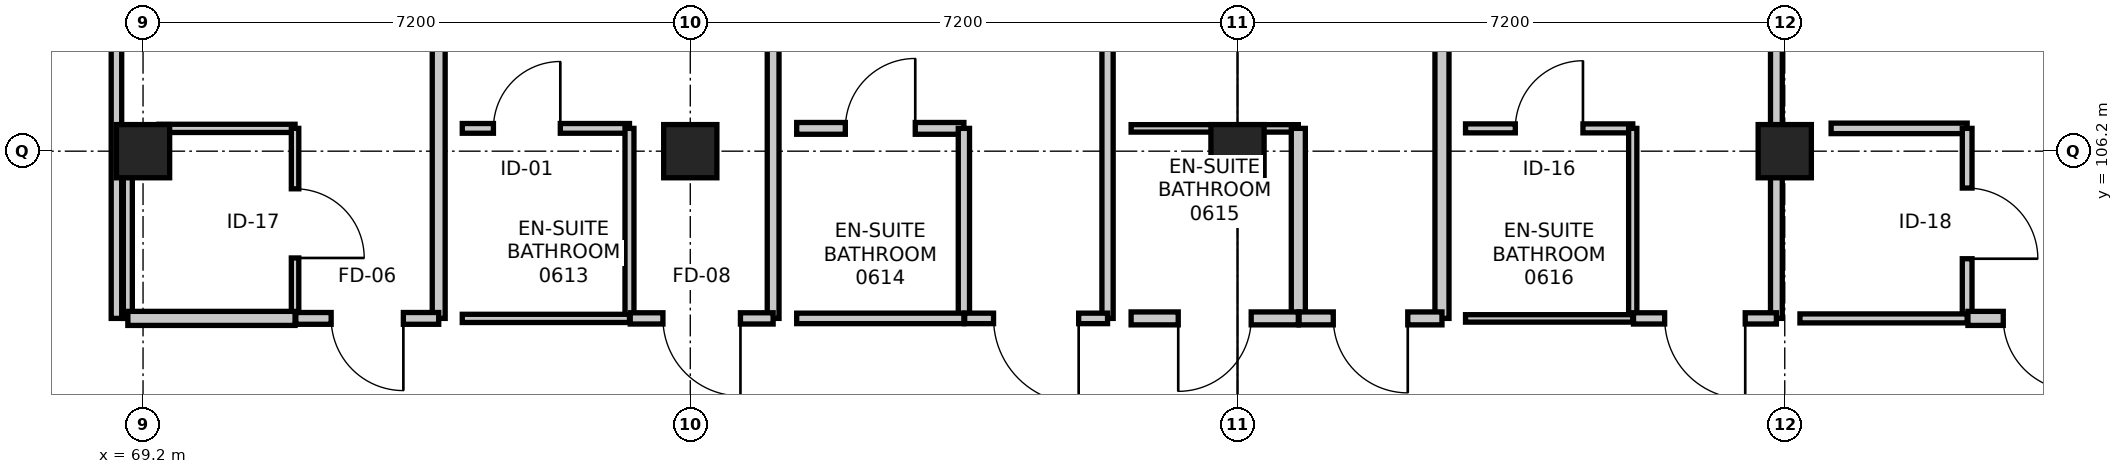
"""IFC4 building model, lengths in metres.
Left out: names, types, materials, properties, quantities, classifications, styles, units other than length and angle.
Written with IfcOpenShell. Run it as: python <this file> out.ifc"""

import sys

from ifc_helpers import new_model, si_unit, direction, frame, frame_2d, origin, origin_2d, place, context, subcontext, project, spatial, rectangle, extrude, element, fill, save


model = new_model("IFC4")
c1 = context("Model", 3, precision=1e-05, world=origin(), true_north=direction((0.0, 1.0)))
c2 = subcontext(c1, "Body", "Model", "MODEL_VIEW")
j1 = project(units=[si_unit("LENGTHUNIT", "METRE"), si_unit("PLANEANGLEUNIT", "RADIAN")], contexts=[c1])
p1 = place(None, origin())
s1 = spatial("IfcSite", under=j1, at=p1, CompositionType="ELEMENT")
p2 = place(p1, origin())
s2 = spatial("IfcBuilding", under=s1, at=p2, CompositionType="ELEMENT")
p3 = place(p2, frame((0.0, 0.0, 26.4)))
s3 = spatial("IfcBuildingStorey", under=s2, at=p3, CompositionType="ELEMENT", Elevation=26.4)
for number, where, z_axis, x_axis in (
    (1, (69.2, 106.2, 0.0), (0.0, 0.0, 1.0), (1.0, 0.0, 0.0)),
    (2, (76.4, 106.2, 0.0), (0.0, 0.0, 1.0), (1.0, 0.0, 0.0)),
    (3, (83.6, 106.2, 0.0), (0.0, 0.0, 1.0), (1.0, 0.0, 0.0)),
    (4, (90.8, 106.2, 0.0), (0.0, 0.0, 1.0), (1.0, 0.0, 0.0)),
):
    element("IfcColumn", number, at=place(p3, frame(where, z_axis=z_axis, x_axis=x_axis)), inside=s3, PredefinedType="COLUMN", context=c2, shape_type="SweptSolid", body=[
        extrude(rectangle(XDim=0.7, YDim=0.7, at=origin_2d()), origin(), (0.0, 0.0, 1.0), 3.6),
    ])
p4 = place(p3, frame((69.0, 104.0, 0.0), z_axis=(0.0, 0.0, 1.0), x_axis=(0.0, 1.0, 0.0)))
e5 = element("IfcWall", 5, at=p4, inside=s3, PredefinedType="PARTITIONING", context=c2, shape_type="SweptSolid", body=[
    extrude(rectangle(XDim=2.09, YDim=0.118, at=frame_2d((1.045, 0.0))), origin(), (0.0, 0.0, 1.0), 2.685),
])
p5 = place(p3, frame((69.41, 106.5, 0.0), z_axis=(0.0, 0.0, 1.0), x_axis=(1.0, 0.0, 0.0)))
e6 = element("IfcWall", 6, at=p5, inside=s3, PredefinedType="PARTITIONING", context=c2, shape_type="SweptSolid", body=[
    extrude(rectangle(XDim=1.79, YDim=0.108, at=frame_2d((0.895, 0.0))), origin(), (0.0, 0.0, 1.0), 3.35),
])
p6 = place(p3, frame((71.2, 106.5, 0.0), z_axis=(0.0, 0.0, 1.0), x_axis=(0.0, -1.0, 0.0)))
e7 = element("IfcWall", 7, at=p6, inside=s3, PredefinedType="PARTITIONING", context=c2, shape_type="SweptSolid", body=[
    extrude(rectangle(XDim=2.5, YDim=0.098, at=frame_2d((1.25, 0.0))), origin(), (0.0, 0.0, 1.0), 2.735),
])
p7 = place(p6, frame((0.795, 0.0, 0.0)))
e8 = element("IfcOpeningElement", 8, at=p7, cuts=e7, PredefinedType="OPENING", context=c2, shape_type="SweptSolid", body=[
    extrude(rectangle(XDim=0.91, YDim=2.11, at=frame_2d((0.455, 1.055))), frame((0.0, 0.059, 0.0), z_axis=(0.0, -1.0, 0.0), x_axis=(1.0, 0.0, 0.0)), (0.0, 0.0, 1.0), 0.118),
])
p8 = place(p3, frame((71.2, 104.0, 0.0), z_axis=(0.0, 0.0, 1.0), x_axis=(-1.0, 0.0, 0.0)))
e9 = element("IfcWall", 9, at=p8, inside=s3, PredefinedType="PARTITIONING", context=c2, shape_type="SweptSolid", body=[
    extrude(rectangle(XDim=2.2, YDim=0.185, at=frame_2d((1.1, 0.0))), origin(), (0.0, 0.0, 1.0), 2.685),
])
p9 = place(p3, frame((68.85, 104.0, 0.0), z_axis=(0.0, 0.0, 1.0), x_axis=(0.0, 1.0, 0.0)))
e10 = element("IfcWall", 10, at=p9, inside=s3, PredefinedType="PARTITIONING", context=c2, shape_type="SweptSolid", body=[
    extrude(rectangle(XDim=10.741, YDim=0.138, at=frame_2d((5.371, 0.0))), origin(), (0.0, 0.0, 1.0), 2.735),
])
p10 = place(p3, frame((73.09, 115.362, 0.0), z_axis=(0.0, 0.0, 1.0), x_axis=(0.0, -1.0, 0.0)))
e11 = element("IfcWall", 11, at=p10, inside=s3, PredefinedType="PARTITIONING", context=c2, shape_type="SweptSolid", body=[
    extrude(rectangle(XDim=11.362, YDim=0.17, at=frame_2d((5.681, 0.0))), origin(), (0.0, 0.0, 1.0), 2.735),
])
p11 = place(p3, frame((73.09, 104.0, 0.0), z_axis=(0.0, 0.0, 1.0), x_axis=(-1.0, 0.0, 0.0)))
e12 = element("IfcWall", 12, at=p11, inside=s3, PredefinedType="PARTITIONING", context=c2, shape_type="SweptSolid", body=[
    extrude(rectangle(XDim=1.88, YDim=0.155, at=frame_2d((0.94, 0.0))), origin(), (0.0, 0.0, 1.0), 3.35),
])
p12 = place(p11, frame((0.465, 0.0, 0.0)))
e13 = element("IfcOpeningElement", 13, at=p12, cuts=e12, PredefinedType="OPENING", context=c2, shape_type="SweptSolid", body=[
    extrude(rectangle(XDim=0.95, YDim=2.1, at=frame_2d((0.475, 1.05))), frame((0.0, 0.087, 0.0), z_axis=(0.0, -1.0, 0.0), x_axis=(1.0, 0.0, 0.0)), (0.0, 0.0, 1.0), 0.175),
])
p13 = place(p3, frame((73.4, 106.5, 0.0), z_axis=(0.0, 0.0, 1.0), x_axis=(1.0, 0.0, 0.0)))
e14 = element("IfcWall", 14, at=p13, inside=s3, PredefinedType="PARTITIONING", context=c2, shape_type="SweptSolid", body=[
    extrude(rectangle(XDim=2.2, YDim=0.128, at=frame_2d((1.1, 0.0))), origin(), (0.0, 0.0, 1.0), 3.35),
])
p14 = place(p13, frame((0.41, 0.0, 0.0)))
e15 = element("IfcOpeningElement", 15, at=p14, cuts=e14, PredefinedType="OPENING", context=c2, shape_type="SweptSolid", body=[
    extrude(rectangle(XDim=0.88, YDim=2.06, at=frame_2d((0.44, 1.03))), frame((0.0, 0.074, 0.0), z_axis=(0.0, -1.0, 0.0), x_axis=(1.0, 0.0, 0.0)), (0.0, 0.0, 1.0), 0.148),
])
p15 = place(p3, frame((75.6, 106.5, 0.0), z_axis=(0.0, 0.0, 1.0), x_axis=(0.0, -1.0, 0.0)))
e16 = element("IfcWall", 16, at=p15, inside=s3, PredefinedType="PARTITIONING", context=c2, shape_type="SweptSolid", body=[
    extrude(rectangle(XDim=2.5, YDim=0.118, at=frame_2d((1.25, 0.0))), origin(), (0.0, 0.0, 1.0), 2.735),
])
p16 = place(p3, frame((75.6, 104.0, 0.0), z_axis=(0.0, 0.0, 1.0), x_axis=(-1.0, 0.0, 0.0)))
e17 = element("IfcWall", 17, at=p16, inside=s3, PredefinedType="PARTITIONING", context=c2, shape_type="SweptSolid", body=[
    extrude(rectangle(XDim=2.2, YDim=0.108, at=frame_2d((1.1, 0.0))), origin(), (0.0, 0.0, 1.0), 3.35),
])
p17 = place(p3, frame((77.49, 115.603, 0.0), z_axis=(0.0, 0.0, 1.0), x_axis=(0.0, -1.0, 0.0)))
e18 = element("IfcWall", 18, at=p17, inside=s3, PredefinedType="PARTITIONING", context=c2, shape_type="SweptSolid", body=[
    extrude(rectangle(XDim=11.603, YDim=0.155, at=frame_2d((5.801, 0.0))), origin(), (0.0, 0.0, 1.0), 2.735),
])
p18 = place(p3, frame((77.49, 104.0, 0.0), z_axis=(0.0, 0.0, 1.0), x_axis=(-1.0, 0.0, 0.0)))
e19 = element("IfcWall", 19, at=p18, inside=s3, PredefinedType="PARTITIONING", context=c2, shape_type="SweptSolid", body=[
    extrude(rectangle(XDim=1.88, YDim=0.148, at=frame_2d((0.94, 0.0))), origin(), (0.0, 0.0, 1.0), 2.685),
])
p19 = place(p18, frame((0.43, 0.0, 0.0)))
e20 = element("IfcOpeningElement", 20, at=p19, cuts=e19, PredefinedType="OPENING", context=c2, shape_type="SweptSolid", body=[
    extrude(rectangle(XDim=1.02, YDim=2.15, at=frame_2d((0.51, 1.075))), frame((0.0, 0.084, 0.0), z_axis=(0.0, -1.0, 0.0), x_axis=(1.0, 0.0, 0.0)), (0.0, 0.0, 1.0), 0.168),
])
p20 = place(p3, frame((77.8, 106.5, 0.0), z_axis=(0.0, 0.0, 1.0), x_axis=(1.0, 0.0, 0.0)))
e21 = element("IfcWall", 21, at=p20, inside=s3, PredefinedType="PARTITIONING", context=c2, shape_type="SweptSolid", body=[
    extrude(rectangle(XDim=2.2, YDim=0.155, at=frame_2d((1.1, 0.0))), origin(), (0.0, 0.0, 1.0), 3.35),
])
p21 = place(p20, frame((0.64, 0.0, 0.0)))
e22 = element("IfcOpeningElement", 22, at=p21, cuts=e21, PredefinedType="OPENING", context=c2, shape_type="SweptSolid", body=[
    extrude(rectangle(XDim=0.92, YDim=2.1, at=frame_2d((0.46, 1.05))), frame((0.0, 0.087, 0.0), z_axis=(0.0, -1.0, 0.0), x_axis=(1.0, 0.0, 0.0)), (0.0, 0.0, 1.0), 0.175),
])
p22 = place(p3, frame((80.0, 106.5, 0.0), z_axis=(0.0, 0.0, 1.0), x_axis=(0.0, -1.0, 0.0)))
e23 = element("IfcWall", 23, at=p22, inside=s3, PredefinedType="PARTITIONING", context=c2, shape_type="SweptSolid", body=[
    extrude(rectangle(XDim=2.5, YDim=0.148, at=frame_2d((1.25, 0.0))), origin(), (0.0, 0.0, 1.0), 2.735),
])
p23 = place(p3, frame((80.0, 104.0, 0.0), z_axis=(0.0, 0.0, 1.0), x_axis=(-1.0, 0.0, 0.0)))
e24 = element("IfcWall", 24, at=p23, inside=s3, PredefinedType="PARTITIONING", context=c2, shape_type="SweptSolid", body=[
    extrude(rectangle(XDim=2.2, YDim=0.138, at=frame_2d((1.1, 0.0))), origin(), (0.0, 0.0, 1.0), 3.35),
])
p24 = place(p3, frame((81.89, 115.805, 0.0), z_axis=(0.0, 0.0, 1.0), x_axis=(0.0, -1.0, 0.0)))
e25 = element("IfcWall", 25, at=p24, inside=s3, PredefinedType="PARTITIONING", context=c2, shape_type="SweptSolid", body=[
    extrude(rectangle(XDim=11.805, YDim=0.148, at=frame_2d((5.903, 0.0))), origin(), (0.0, 0.0, 1.0), 2.735),
])
p25 = place(p3, frame((81.89, 104.0, 0.0), z_axis=(0.0, 0.0, 1.0), x_axis=(-1.0, 0.0, 0.0)))
e26 = element("IfcWall", 26, at=p25, inside=s3, PredefinedType="PARTITIONING", context=c2, shape_type="SweptSolid", body=[
    extrude(rectangle(XDim=1.88, YDim=0.138, at=frame_2d((0.94, 0.0))), origin(), (0.0, 0.0, 1.0), 3.35),
])
p26 = place(p25, frame((0.38, 0.0, 0.0)))
e27 = element("IfcOpeningElement", 27, at=p26, cuts=e26, PredefinedType="OPENING", context=c2, shape_type="SweptSolid", body=[
    extrude(rectangle(XDim=1.12, YDim=2.2, at=frame_2d((0.56, 1.1))), frame((0.0, 0.079, 0.0), z_axis=(0.0, -1.0, 0.0), x_axis=(1.0, 0.0, 0.0)), (0.0, 0.0, 1.0), 0.158),
])
p27 = place(p3, frame((82.2, 106.5, 0.0), z_axis=(0.0, 0.0, 1.0), x_axis=(1.0, 0.0, 0.0)))
e28 = element("IfcWall", 28, at=p27, inside=s3, PredefinedType="PARTITIONING", context=c2, shape_type="SweptSolid", body=[
    extrude(rectangle(XDim=2.2, YDim=0.098, at=frame_2d((1.1, 0.0))), origin(), (0.0, 0.0, 1.0), 2.685),
])
p28 = place(p3, frame((84.4, 106.5, 0.0), z_axis=(0.0, 0.0, 1.0), x_axis=(0.0, -1.0, 0.0)))
e29 = element("IfcWall", 29, at=p28, inside=s3, PredefinedType="PARTITIONING", context=c2, shape_type="SweptSolid", body=[
    extrude(rectangle(XDim=2.5, YDim=0.185, at=frame_2d((1.25, 0.0))), origin(), (0.0, 0.0, 1.0), 2.735),
])
p29 = place(p3, frame((84.4, 104.0, 0.0), z_axis=(0.0, 0.0, 1.0), x_axis=(-1.0, 0.0, 0.0)))
e30 = element("IfcWall", 30, at=p29, inside=s3, PredefinedType="PARTITIONING", context=c2, shape_type="SweptSolid", body=[
    extrude(rectangle(XDim=2.2, YDim=0.17, at=frame_2d((1.1, 0.0))), origin(), (0.0, 0.0, 1.0), 2.685),
])
p30 = place(p29, frame((0.62, 0.0, 0.0)))
e31 = element("IfcOpeningElement", 31, at=p30, cuts=e30, PredefinedType="OPENING", context=c2, shape_type="SweptSolid", body=[
    extrude(rectangle(XDim=0.96, YDim=2.14, at=frame_2d((0.48, 1.07))), frame((0.0, 0.095, 0.0), z_axis=(0.0, -1.0, 0.0), x_axis=(1.0, 0.0, 0.0)), (0.0, 0.0, 1.0), 0.19),
])
p31 = place(p3, frame((86.29, 115.965, 0.0), z_axis=(0.0, 0.0, 1.0), x_axis=(0.0, -1.0, 0.0)))
e32 = element("IfcWall", 32, at=p31, inside=s3, PredefinedType="PARTITIONING", context=c2, shape_type="SweptSolid", body=[
    extrude(rectangle(XDim=11.965, YDim=0.185, at=frame_2d((5.983, 0.0))), origin(), (0.0, 0.0, 1.0), 2.735),
])
p32 = place(p3, frame((86.29, 104.0, 0.0), z_axis=(0.0, 0.0, 1.0), x_axis=(-1.0, 0.0, 0.0)))
e33 = element("IfcWall", 33, at=p32, inside=s3, PredefinedType="PARTITIONING", context=c2, shape_type="SweptSolid", body=[
    extrude(rectangle(XDim=1.88, YDim=0.17, at=frame_2d((0.94, 0.0))), origin(), (0.0, 0.0, 1.0), 3.35),
])
p33 = place(p32, frame((0.45, 0.0, 0.0)))
e34 = element("IfcOpeningElement", 34, at=p33, cuts=e33, PredefinedType="OPENING", context=c2, shape_type="SweptSolid", body=[
    extrude(rectangle(XDim=0.98, YDim=2.15, at=frame_2d((0.49, 1.075))), frame((0.0, 0.095, 0.0), z_axis=(0.0, -1.0, 0.0), x_axis=(1.0, 0.0, 0.0)), (0.0, 0.0, 1.0), 0.19),
])
p34 = place(p3, frame((86.6, 106.5, 0.0), z_axis=(0.0, 0.0, 1.0), x_axis=(1.0, 0.0, 0.0)))
e35 = element("IfcWall", 35, at=p34, inside=s3, PredefinedType="PARTITIONING", context=c2, shape_type="SweptSolid", body=[
    extrude(rectangle(XDim=2.2, YDim=0.118, at=frame_2d((1.1, 0.0))), origin(), (0.0, 0.0, 1.0), 3.35),
])
p35 = place(p34, frame((0.655, 0.0, 0.0)))
e36 = element("IfcOpeningElement", 36, at=p35, cuts=e35, PredefinedType="OPENING", context=c2, shape_type="SweptSolid", body=[
    extrude(rectangle(XDim=0.89, YDim=2.09, at=frame_2d((0.445, 1.045))), frame((0.0, 0.069, 0.0), z_axis=(0.0, -1.0, 0.0), x_axis=(1.0, 0.0, 0.0)), (0.0, 0.0, 1.0), 0.138),
])
p36 = place(p3, frame((88.8, 106.5, 0.0), z_axis=(0.0, 0.0, 1.0), x_axis=(0.0, -1.0, 0.0)))
e37 = element("IfcWall", 37, at=p36, inside=s3, PredefinedType="PARTITIONING", context=c2, shape_type="SweptSolid", body=[
    extrude(rectangle(XDim=2.5, YDim=0.108, at=frame_2d((1.25, 0.0))), origin(), (0.0, 0.0, 1.0), 2.735),
])
p37 = place(p3, frame((88.8, 104.0, 0.0), z_axis=(0.0, 0.0, 1.0), x_axis=(-1.0, 0.0, 0.0)))
e38 = element("IfcWall", 38, at=p37, inside=s3, PredefinedType="PARTITIONING", context=c2, shape_type="SweptSolid", body=[
    extrude(rectangle(XDim=2.2, YDim=0.098, at=frame_2d((1.1, 0.0))), origin(), (0.0, 0.0, 1.0), 3.35),
])
p38 = place(p3, frame((90.69, 115.717, 0.0), z_axis=(0.0, 0.0, 1.0), x_axis=(0.0, -1.0, 0.0)))
e39 = element("IfcWall", 39, at=p38, inside=s3, PredefinedType="PARTITIONING", context=c2, shape_type="SweptSolid", body=[
    extrude(rectangle(XDim=11.717, YDim=0.155, at=frame_2d((5.859, 0.0))), origin(), (0.0, 0.0, 1.0), 2.685),
])
p39 = place(p3, frame((90.69, 104.0, 0.0), z_axis=(0.0, 0.0, 1.0), x_axis=(-1.0, 0.0, 0.0)))
e40 = element("IfcWall", 40, at=p39, inside=s3, PredefinedType="PARTITIONING", context=c2, shape_type="SweptSolid", body=[
    extrude(rectangle(XDim=1.88, YDim=0.148, at=frame_2d((0.94, 0.0))), origin(), (0.0, 0.0, 1.0), 2.685),
])
p40 = place(p39, frame((0.41, 0.0, 0.0)))
e41 = element("IfcOpeningElement", 41, at=p40, cuts=e40, PredefinedType="OPENING", context=c2, shape_type="SweptSolid", body=[
    extrude(rectangle(XDim=1.06, YDim=2.2, at=frame_2d((0.53, 1.1))), frame((0.0, 0.084, 0.0), z_axis=(0.0, -1.0, 0.0), x_axis=(1.0, 0.0, 0.0)), (0.0, 0.0, 1.0), 0.168),
])
p41 = place(p3, frame((91.41, 106.5, 0.0), z_axis=(0.0, 0.0, 1.0), x_axis=(1.0, 0.0, 0.0)))
e42 = element("IfcWall", 42, at=p41, inside=s3, PredefinedType="PARTITIONING", context=c2, shape_type="SweptSolid", body=[
    extrude(rectangle(XDim=1.79, YDim=0.138, at=frame_2d((0.895, 0.0))), origin(), (0.0, 0.0, 1.0), 3.35),
])
p42 = place(p3, frame((93.2, 106.5, 0.0), z_axis=(0.0, 0.0, 1.0), x_axis=(0.0, -1.0, 0.0)))
e43 = element("IfcWall", 43, at=p42, inside=s3, PredefinedType="PARTITIONING", context=c2, shape_type="SweptSolid", body=[
    extrude(rectangle(XDim=2.5, YDim=0.128, at=frame_2d((1.25, 0.0))), origin(), (0.0, 0.0, 1.0), 2.735),
])
p43 = place(p42, frame((0.785, 0.0, 0.0)))
e44 = element("IfcOpeningElement", 44, at=p43, cuts=e43, PredefinedType="OPENING", context=c2, shape_type="SweptSolid", body=[
    extrude(rectangle(XDim=0.93, YDim=2.13, at=frame_2d((0.465, 1.065))), frame((0.0, 0.074, 0.0), z_axis=(0.0, -1.0, 0.0), x_axis=(1.0, 0.0, 0.0)), (0.0, 0.0, 1.0), 0.148),
])
p44 = place(p3, frame((93.2, 104.0, 0.0), z_axis=(0.0, 0.0, 1.0), x_axis=(-1.0, 0.0, 0.0)))
e45 = element("IfcWall", 45, at=p44, inside=s3, PredefinedType="PARTITIONING", context=c2, shape_type="SweptSolid", body=[
    extrude(rectangle(XDim=2.2, YDim=0.118, at=frame_2d((1.1, 0.0))), origin(), (0.0, 0.0, 1.0), 2.685),
])
p45 = place(p3, frame((95.09, 104.0, 0.0), z_axis=(0.0, 0.0, 1.0), x_axis=(-1.0, 0.0, 0.0)))
e46 = element("IfcWall", 46, at=p45, inside=s3, PredefinedType="PARTITIONING", context=c2, shape_type="SweptSolid", body=[
    extrude(rectangle(XDim=1.88, YDim=0.185, at=frame_2d((0.94, 0.0))), origin(), (0.0, 0.0, 1.0), 3.35),
])
p46 = place(p45, frame((0.465, 0.0, 0.0)))
e47 = element("IfcOpeningElement", 47, at=p46, cuts=e46, PredefinedType="OPENING", context=c2, shape_type="SweptSolid", body=[
    extrude(rectangle(XDim=0.95, YDim=2.1, at=frame_2d((0.475, 1.05))), frame((0.0, 0.103, 0.0), z_axis=(0.0, -1.0, 0.0), x_axis=(1.0, 0.0, 0.0)), (0.0, 0.0, 1.0), 0.205),
])
p47 = place(p7, origin())
e48 = element("IfcDoor", 48, at=p47, inside=s3, OperationType="SINGLE_SWING_RIGHT", PredefinedType="DOOR", context=c2, shape_type="SweptSolid", body=[
    extrude(rectangle(XDim=0.91, YDim=2.11, at=frame_2d((0.455, 1.055))), frame((0.0, 0.025, 0.0), z_axis=(0.0, -1.0, 0.0), x_axis=(1.0, 0.0, 0.0)), (0.0, 0.0, 1.0), 0.05),
])
fill(e8, e48)
p48 = place(p12, origin())
e49 = element("IfcDoor", 49, at=p48, inside=s3, OperationType="SINGLE_SWING_LEFT", PredefinedType="DOOR", context=c2, shape_type="SweptSolid", body=[
    extrude(rectangle(XDim=0.95, YDim=2.1, at=frame_2d((0.475, 1.05))), frame((0.0, 0.025, 0.0), z_axis=(0.0, -1.0, 0.0), x_axis=(1.0, 0.0, 0.0)), (0.0, 0.0, 1.0), 0.05),
])
fill(e13, e49)
p49 = place(p14, origin())
e50 = element("IfcDoor", 50, at=p49, inside=s3, OperationType="SINGLE_SWING_RIGHT", PredefinedType="DOOR", context=c2, shape_type="SweptSolid", body=[
    extrude(rectangle(XDim=0.88, YDim=2.06, at=frame_2d((0.44, 1.03))), frame((0.0, 0.025, 0.0), z_axis=(0.0, -1.0, 0.0), x_axis=(1.0, 0.0, 0.0)), (0.0, 0.0, 1.0), 0.05),
])
fill(e15, e50)
p50 = place(p19, origin())
e51 = element("IfcDoor", 51, at=p50, inside=s3, OperationType="SINGLE_SWING_LEFT", PredefinedType="DOOR", context=c2, shape_type="SweptSolid", body=[
    extrude(rectangle(XDim=1.02, YDim=2.15, at=frame_2d((0.51, 1.075))), frame((0.0, 0.025, 0.0), z_axis=(0.0, -1.0, 0.0), x_axis=(1.0, 0.0, 0.0)), (0.0, 0.0, 1.0), 0.05),
])
fill(e20, e51)
p51 = place(p21, origin())
e52 = element("IfcDoor", 52, at=p51, inside=s3, OperationType="SINGLE_SWING_RIGHT", PredefinedType="DOOR", context=c2, shape_type="SweptSolid", body=[
    extrude(rectangle(XDim=0.92, YDim=2.1, at=frame_2d((0.46, 1.05))), frame((0.0, 0.025, 0.0), z_axis=(0.0, -1.0, 0.0), x_axis=(1.0, 0.0, 0.0)), (0.0, 0.0, 1.0), 0.05),
])
fill(e22, e52)
p52 = place(p26, origin())
e53 = element("IfcDoor", 53, at=p52, inside=s3, OperationType="SINGLE_SWING_LEFT", PredefinedType="DOOR", context=c2, shape_type="SweptSolid", body=[
    extrude(rectangle(XDim=1.12, YDim=2.2, at=frame_2d((0.56, 1.1))), frame((0.0, 0.025, 0.0), z_axis=(0.0, -1.0, 0.0), x_axis=(1.0, 0.0, 0.0)), (0.0, 0.0, 1.0), 0.05),
])
fill(e27, e53)
p53 = place(p30, origin())
e54 = element("IfcDoor", 54, at=p53, inside=s3, OperationType="SINGLE_SWING_RIGHT", PredefinedType="DOOR", context=c2, shape_type="SweptSolid", body=[
    extrude(rectangle(XDim=0.96, YDim=2.14, at=frame_2d((0.48, 1.07))), frame((0.0, 0.025, 0.0), z_axis=(0.0, -1.0, 0.0), x_axis=(1.0, 0.0, 0.0)), (0.0, 0.0, 1.0), 0.05),
])
fill(e31, e54)
p54 = place(p33, origin())
e55 = element("IfcDoor", 55, at=p54, inside=s3, OperationType="SINGLE_SWING_LEFT", PredefinedType="DOOR", context=c2, shape_type="SweptSolid", body=[
    extrude(rectangle(XDim=0.98, YDim=2.15, at=frame_2d((0.49, 1.075))), frame((0.0, 0.025, 0.0), z_axis=(0.0, -1.0, 0.0), x_axis=(1.0, 0.0, 0.0)), (0.0, 0.0, 1.0), 0.05),
])
fill(e34, e55)
p55 = place(p35, origin())
e56 = element("IfcDoor", 56, at=p55, inside=s3, OperationType="SINGLE_SWING_RIGHT", PredefinedType="DOOR", context=c2, shape_type="SweptSolid", body=[
    extrude(rectangle(XDim=0.89, YDim=2.09, at=frame_2d((0.445, 1.045))), frame((0.0, 0.025, 0.0), z_axis=(0.0, -1.0, 0.0), x_axis=(1.0, 0.0, 0.0)), (0.0, 0.0, 1.0), 0.05),
])
fill(e36, e56)
p56 = place(p40, origin())
e57 = element("IfcDoor", 57, at=p56, inside=s3, OperationType="SINGLE_SWING_LEFT", PredefinedType="DOOR", context=c2, shape_type="SweptSolid", body=[
    extrude(rectangle(XDim=1.06, YDim=2.2, at=frame_2d((0.53, 1.1))), frame((0.0, 0.025, 0.0), z_axis=(0.0, -1.0, 0.0), x_axis=(1.0, 0.0, 0.0)), (0.0, 0.0, 1.0), 0.05),
])
fill(e41, e57)
p57 = place(p43, origin())
e58 = element("IfcDoor", 58, at=p57, inside=s3, OperationType="SINGLE_SWING_RIGHT", PredefinedType="DOOR", context=c2, shape_type="SweptSolid", body=[
    extrude(rectangle(XDim=0.93, YDim=2.13, at=frame_2d((0.465, 1.065))), frame((0.0, 0.025, 0.0), z_axis=(0.0, -1.0, 0.0), x_axis=(1.0, 0.0, 0.0)), (0.0, 0.0, 1.0), 0.05),
])
fill(e44, e58)
p58 = place(p46, origin())
e59 = element("IfcDoor", 59, at=p58, inside=s3, OperationType="SINGLE_SWING_LEFT", PredefinedType="DOOR", context=c2, shape_type="SweptSolid", body=[
    extrude(rectangle(XDim=0.95, YDim=2.1, at=frame_2d((0.475, 1.05))), frame((0.0, 0.025, 0.0), z_axis=(0.0, -1.0, 0.0), x_axis=(1.0, 0.0, 0.0)), (0.0, 0.0, 1.0), 0.05),
])
fill(e47, e59)
save(model, sys.argv[1])
